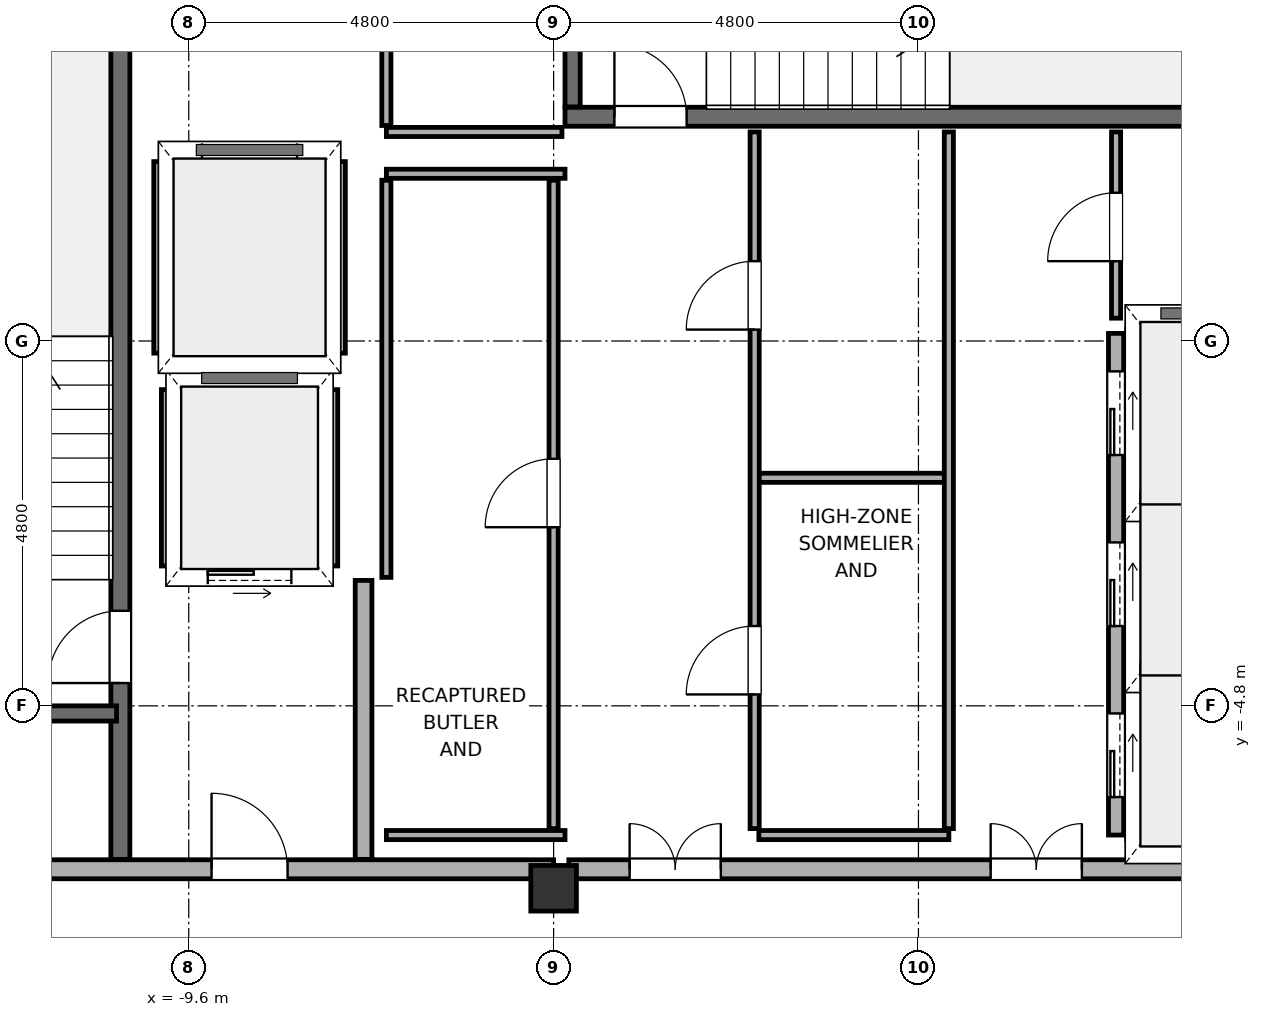
"""IFC4 building model, lengths in metres.
Left out: names, types, materials, properties, quantities, classifications, styles, units other than length and angle.
Written with IfcOpenShell. Run it as: python <this file> out.ifc"""

import sys

from ifc_helpers import new_model, si_unit, direction, frame, frame_2d, origin, origin_2d, place, context, subcontext, project, spatial, rectangle, hollow_rectangle, extrude, element, fill, save


model = new_model("IFC4")
c1 = context("Model", 3, precision=1e-05, world=origin(), true_north=direction((0.0, 1.0)))
c2 = subcontext(c1, "Body", "Model", "MODEL_VIEW")
j1 = project(units=[si_unit("LENGTHUNIT", "METRE"), si_unit("PLANEANGLEUNIT", "RADIAN")], contexts=[c1])
p1 = place(None, origin())
s1 = spatial("IfcSite", under=j1, at=p1, CompositionType="ELEMENT")
p2 = place(p1, origin())
s2 = spatial("IfcBuilding", under=s1, at=p2, CompositionType="ELEMENT")
p3 = place(p2, frame((0.0, 0.0, 249.25)))
s3 = spatial("IfcBuildingStorey", under=s2, at=p3, CompositionType="ELEMENT", Elevation=249.25)
p4 = place(p3, frame((-4.8, -7.2, 0.0), z_axis=(0.0, 0.0, 1.0), x_axis=(1.0, 0.0, 0.0)))
e1 = element("IfcColumn", 1, at=p4, inside=s3, PredefinedType="COLUMN", context=c2, shape_type="SweptSolid", body=[
    extrude(hollow_rectangle(XDim=0.6, YDim=0.6, WallThickness=0.028, at=origin_2d()), origin(), (0.0, 0.0, 1.0), 3.85),
])
p5 = place(p3, frame((-14.2, -6.95, 0.0), z_axis=(0.0, 0.0, 1.0), x_axis=(1.0, 0.0, 0.0)))
e2 = element("IfcWall", 2, at=p5, inside=s3, PredefinedType="SOLIDWALL", context=c2, shape_type="SweptSolid", body=[
    extrude(rectangle(XDim=9.4, YDim=0.25, at=frame_2d((4.7, 0.0))), origin(), (0.0, 0.0, 1.0), 2.27),
])
p6 = place(p5, frame((4.9, 0.0, 0.0)))
e3 = element("IfcOpeningElement", 3, at=p6, cuts=e2, PredefinedType="OPENING", context=c2, shape_type="SweptSolid", body=[
    extrude(rectangle(XDim=1.0, YDim=2.15, at=frame_2d((0.5, 1.075))), frame((0.0, 0.14, 0.0), z_axis=(0.0, -1.0, 0.0), x_axis=(1.0, 0.0, 0.0)), (0.0, 0.0, 1.0), 0.28),
])
p7 = place(p3, frame((-4.6, -6.95, 0.0), z_axis=(0.0, 0.0, 1.0), x_axis=(1.0, 0.0, 0.0)))
e4 = element("IfcWall", 4, at=p7, inside=s3, PredefinedType="SOLIDWALL", context=c2, shape_type="SweptSolid", body=[
    extrude(rectangle(XDim=9.2, YDim=0.25, at=frame_2d((4.6, 0.0))), origin(), (0.0, 0.0, 1.0), 2.47),
])
p8 = place(p7, frame((0.8, 0.0, 0.0)))
e5 = element("IfcOpeningElement", 5, at=p8, cuts=e4, PredefinedType="OPENING", context=c2, shape_type="SweptSolid", body=[
    extrude(rectangle(XDim=1.2, YDim=2.2, at=frame_2d((0.6, 1.1))), frame((0.0, 0.14, 0.0), z_axis=(0.0, -1.0, 0.0), x_axis=(1.0, 0.0, 0.0)), (0.0, 0.0, 1.0), 0.28),
])
p9 = place(p7, frame((5.55, 0.0, 0.0)))
e6 = element("IfcOpeningElement", 6, at=p9, cuts=e4, PredefinedType="OPENING", context=c2, shape_type="SweptSolid", body=[
    extrude(rectangle(XDim=1.2, YDim=2.2, at=frame_2d((0.6, 1.1))), frame((0.0, 0.14, 0.0), z_axis=(0.0, -1.0, 0.0), x_axis=(1.0, 0.0, 0.0)), (0.0, 0.0, 1.0), 0.28),
])
p10 = place(p3, frame((-7.3, -6.82, 0.0), z_axis=(0.0, 0.0, 1.0), x_axis=(0.0, 1.0, 0.0)))
e7 = element("IfcWall", 7, at=p10, inside=s3, PredefinedType="SOLIDWALL", context=c2, shape_type="SweptSolid", body=[
    extrude(rectangle(XDim=3.67, YDim=0.22, at=frame_2d((1.835, 0.0))), origin(), (0.0, 0.0, 1.0), 2.27),
])
p11 = place(p3, frame((-10.5, -6.82, -0.18), z_axis=(0.0, 0.0, 1.0), x_axis=(0.0, 1.0, 0.0)))
e8 = element("IfcWall", 8, at=p11, inside=s3, PredefinedType="SOLIDWALL", context=c2, shape_type="SweptSolid", body=[
    extrude(rectangle(XDim=13.64, YDim=0.25, at=frame_2d((6.82, 0.0))), origin(), (0.0, 0.0, 1.0), 3.85),
])
p12 = place(p11, frame((2.32, 0.0, 0.18)))
e9 = element("IfcOpeningElement", 9, at=p12, cuts=e8, PredefinedType="OPENING", context=c2, shape_type="SweptSolid", body=[
    extrude(rectangle(XDim=0.95, YDim=2.15, at=frame_2d((0.475, 1.075))), frame((0.0, 0.14, 0.0), z_axis=(0.0, -1.0, 0.0), x_axis=(1.0, 0.0, 0.0)), (0.0, 0.0, 1.0), 0.28),
])
p13 = place(p3, frame((-14.2, -4.9, -0.18), z_axis=(0.0, 0.0, 1.0), x_axis=(1.0, 0.0, 0.0)))
e10 = element("IfcWall", 10, at=p13, inside=s3, PredefinedType="SOLIDWALL", context=c2, shape_type="SweptSolid", body=[
    extrude(rectangle(XDim=3.65, YDim=0.2, at=frame_2d((1.825, 0.0))), origin(), (0.0, 0.0, 1.0), 3.85),
])
p14 = place(p3, frame((-4.65, 2.95, -0.18), z_axis=(0.0, 0.0, 1.0), x_axis=(1.0, 0.0, 0.0)))
e11 = element("IfcWall", 11, at=p14, inside=s3, PredefinedType="SOLIDWALL", context=c2, shape_type="SweptSolid", body=[
    extrude(rectangle(XDim=9.9, YDim=0.25, at=frame_2d((4.95, 0.0))), origin(), (0.0, 0.0, 1.0), 3.85),
])
p15 = place(p14, frame((0.65, 0.0, 0.18)))
e12 = element("IfcOpeningElement", 12, at=p15, cuts=e11, PredefinedType="OPENING", context=c2, shape_type="SweptSolid", body=[
    extrude(rectangle(XDim=0.95, YDim=2.15, at=frame_2d((0.475, 1.075))), frame((0.0, 0.14, 0.0), z_axis=(0.0, -1.0, 0.0), x_axis=(1.0, 0.0, 0.0)), (0.0, 0.0, 1.0), 0.28),
])
p16 = place(p3, frame((-4.55, 3.08, -0.18), z_axis=(0.0, 0.0, 1.0), x_axis=(0.0, 1.0, 0.0)))
e13 = element("IfcWall", 13, at=p16, inside=s3, PredefinedType="SOLIDWALL", context=c2, shape_type="SweptSolid", body=[
    extrude(rectangle(XDim=3.74, YDim=0.2, at=frame_2d((1.87, 0.0))), origin(), (0.0, 0.0, 1.0), 3.85),
])
p17 = place(p3, frame((2.6, -6.5, 0.0), z_axis=(0.0, 0.0, 1.0), x_axis=(0.0, 1.0, 0.0)))
e14 = element("IfcWall", 14, at=p17, inside=s3, PredefinedType="SOLIDWALL", context=c2, shape_type="SweptSolid", body=[
    extrude(rectangle(XDim=6.6, YDim=0.2, at=frame_2d((3.3, 0.0))), origin(), (0.0, 0.0, 1.0), 3.67),
])
p18 = place(p17, frame((0.5, 0.0, 0.0)))
e15 = element("IfcOpeningElement", 15, at=p18, cuts=e14, PredefinedType="OPENING", context=c2, shape_type="SweptSolid", body=[
    extrude(rectangle(XDim=1.1, YDim=2.2, at=frame_2d((0.55, 1.1))), frame((0.0, 0.115, 0.0), z_axis=(0.0, -1.0, 0.0), x_axis=(1.0, 0.0, 0.0)), (0.0, 0.0, 1.0), 0.23),
])
p19 = place(p17, frame((2.75, 0.0, 0.0)))
e16 = element("IfcOpeningElement", 16, at=p19, cuts=e14, PredefinedType="OPENING", context=c2, shape_type="SweptSolid", body=[
    extrude(rectangle(XDim=1.1, YDim=2.2, at=frame_2d((0.55, 1.1))), frame((0.0, 0.115, 0.0), z_axis=(0.0, -1.0, 0.0), x_axis=(1.0, 0.0, 0.0)), (0.0, 0.0, 1.0), 0.23),
])
p20 = place(p17, frame((5.0, 0.0, 0.0)))
e17 = element("IfcOpeningElement", 17, at=p20, cuts=e14, PredefinedType="OPENING", context=c2, shape_type="SweptSolid", body=[
    extrude(rectangle(XDim=1.1, YDim=2.2, at=frame_2d((0.55, 1.1))), frame((0.0, 0.115, 0.0), z_axis=(0.0, -1.0, 0.0), x_axis=(1.0, 0.0, 0.0)), (0.0, 0.0, 1.0), 0.23),
])
for number, where, z_axis, x_axis in (
    (18, (2.74, -6.5, 0.0), (0.0, 0.0, 1.0), (1.0, 0.0, 0.0)),
    (19, (2.74, -4.325, 0.0), (0.0, 0.0, 1.0), (1.0, 0.0, 0.0)),
    (20, (2.74, -2.075, 0.0), (0.0, 0.0, 1.0), (1.0, 0.0, 0.0)),
    (21, (2.74, 0.1, 0.0), (0.0, 0.0, 1.0), (1.0, 0.0, 0.0)),
):
    element("IfcWall", number, at=place(p3, frame(where, z_axis=z_axis, x_axis=x_axis)), inside=s3, PredefinedType="PARTITIONING", context=c2, shape_type="SweptSolid", body=[
        extrude(rectangle(XDim=2.17, YDim=0.12, at=frame_2d((1.085, 0.0))), origin(), (0.0, 0.0, 1.0), 3.67),
    ])
p21 = place(p3, frame((-9.82, -3.1, 0.0), z_axis=(0.0, 0.0, 1.0), x_axis=(1.0, 0.0, 0.0)))
e22 = element("IfcWall", 22, at=p21, inside=s3, PredefinedType="SOLIDWALL", context=c2, shape_type="SweptSolid", body=[
    extrude(rectangle(XDim=2.04, YDim=0.2, at=frame_2d((1.02, 0.0))), origin(), (0.0, 0.0, 1.0), 3.67),
])
p22 = place(p21, frame((0.47, 0.0, 0.0)))
e23 = element("IfcOpeningElement", 23, at=p22, cuts=e22, PredefinedType="OPENING", context=c2, shape_type="SweptSolid", body=[
    extrude(rectangle(XDim=1.1, YDim=2.2, at=frame_2d((0.55, 1.1))), frame((0.0, 0.115, 0.0), z_axis=(0.0, -1.0, 0.0), x_axis=(1.0, 0.0, 0.0)), (0.0, 0.0, 1.0), 0.23),
])
p23 = place(p3, frame((-9.82, -0.5, 0.0), z_axis=(0.0, 0.0, 1.0), x_axis=(1.0, 0.0, 0.0)))
e24 = element("IfcWall", 24, at=p23, inside=s3, PredefinedType="SOLIDWALL", context=c2, shape_type="SweptSolid", body=[
    extrude(rectangle(XDim=2.04, YDim=0.2, at=frame_2d((1.02, 0.0))), origin(), (0.0, 0.0, 1.0), 3.67),
])
for number, where, z_axis, x_axis in (
    (25, (-9.9, -2.96, 0.0), (0.0, 0.0, 1.0), (0.0, 1.0, 0.0)),
    (26, (-7.7, -2.96, 0.0), (0.0, 0.0, 1.0), (0.0, 1.0, 0.0)),
):
    element("IfcWall", number, at=place(p3, frame(where, z_axis=z_axis, x_axis=x_axis)), inside=s3, PredefinedType="PARTITIONING", context=c2, shape_type="SweptSolid", body=[
        extrude(rectangle(XDim=2.32, YDim=0.12, at=frame_2d((1.16, 0.0))), origin(), (0.0, 0.0, 1.0), 3.67),
    ])
p24 = place(p3, frame((-9.92, 2.5, 0.0), z_axis=(0.0, 0.0, 1.0), x_axis=(1.0, 0.0, 0.0)))
e27 = element("IfcWall", 27, at=p24, inside=s3, PredefinedType="SOLIDWALL", context=c2, shape_type="SweptSolid", body=[
    extrude(rectangle(XDim=2.24, YDim=0.2, at=frame_2d((1.12, 0.0))), origin(), (0.0, 0.0, 1.0), 3.67),
])
p25 = place(p24, frame((0.495, 0.0, 0.0)))
e28 = element("IfcOpeningElement", 28, at=p25, cuts=e27, PredefinedType="OPENING", context=c2, shape_type="SweptSolid", body=[
    extrude(rectangle(XDim=1.25, YDim=2.25, at=frame_2d((0.625, 1.125))), frame((0.0, 0.115, 0.0), z_axis=(0.0, -1.0, 0.0), x_axis=(1.0, 0.0, 0.0)), (0.0, 0.0, 1.0), 0.23),
])
p26 = place(p3, frame((-9.92, -0.3, 0.0), z_axis=(0.0, 0.0, 1.0), x_axis=(1.0, 0.0, 0.0)))
e29 = element("IfcWall", 29, at=p26, inside=s3, PredefinedType="SOLIDWALL", context=c2, shape_type="SweptSolid", body=[
    extrude(rectangle(XDim=2.24, YDim=0.2, at=frame_2d((1.12, 0.0))), origin(), (0.0, 0.0, 1.0), 3.67),
])
for number, where, z_axis, x_axis in (
    (30, (-10.0, -0.16, 0.0), (0.0, 0.0, 1.0), (0.0, 1.0, 0.0)),
    (31, (-7.6, -0.16, 0.0), (0.0, 0.0, 1.0), (0.0, 1.0, 0.0)),
):
    element("IfcWall", number, at=place(p3, frame(where, z_axis=z_axis, x_axis=x_axis)), inside=s3, PredefinedType="PARTITIONING", context=c2, shape_type="SweptSolid", body=[
        extrude(rectangle(XDim=2.52, YDim=0.12, at=frame_2d((1.26, 0.0))), origin(), (0.0, 0.0, 1.0), 3.67),
    ])
p27 = place(p3, frame((-7.0, -6.5, 0.0), z_axis=(0.0, 0.0, 1.0), x_axis=(1.0, 0.0, 0.0)))
e32 = element("IfcWall", 32, at=p27, inside=s3, PredefinedType="PARTITIONING", context=c2, shape_type="SweptSolid", body=[
    extrude(rectangle(XDim=2.35, YDim=0.12, at=frame_2d((1.175, 0.0))), origin(), (0.0, 0.0, 1.0), 3.67),
])
for number, where, z_axis, x_axis in (
    (33, (-2.1, -6.5, 0.0), (0.0, 0.0, 1.0), (1.0, 0.0, 0.0)),
    (34, (-2.1, -1.8, 0.0), (0.0, 0.0, 1.0), (1.0, 0.0, 0.0)),
):
    element("IfcWall", number, at=place(p3, frame(where, z_axis=z_axis, x_axis=x_axis)), inside=s3, PredefinedType="PARTITIONING", context=c2, shape_type="SweptSolid", body=[
        extrude(rectangle(XDim=2.5, YDim=0.12, at=frame_2d((1.25, 0.0))), origin(), (0.0, 0.0, 1.0), 3.67),
    ])
p28 = place(p3, frame((-7.0, 2.2, 0.0), z_axis=(0.0, 0.0, 1.0), x_axis=(1.0, 0.0, 0.0)))
e35 = element("IfcWall", 35, at=p28, inside=s3, PredefinedType="PARTITIONING", context=c2, shape_type="SweptSolid", body=[
    extrude(rectangle(XDim=2.35, YDim=0.12, at=frame_2d((1.175, 0.0))), origin(), (0.0, 0.0, 1.0), 3.67),
])
p29 = place(p3, frame((-7.0, 2.75, 0.0), z_axis=(0.0, 0.0, 1.0), x_axis=(1.0, 0.0, 0.0)))
e36 = element("IfcWall", 36, at=p29, inside=s3, PredefinedType="PARTITIONING", context=c2, shape_type="SweptSolid", body=[
    extrude(rectangle(XDim=2.31, YDim=0.12, at=frame_2d((1.155, 0.0))), origin(), (0.0, 0.0, 1.0), 3.67),
])
p30 = place(p3, frame((-7.0, -3.11, 0.0), z_axis=(0.0, 0.0, 1.0), x_axis=(0.0, 1.0, 0.0)))
e37 = element("IfcWall", 37, at=p30, inside=s3, PredefinedType="PARTITIONING", context=c2, shape_type="SweptSolid", body=[
    extrude(rectangle(XDim=5.225, YDim=0.12, at=frame_2d((2.613, 0.0))), origin(), (0.0, 0.0, 1.0), 3.67),
])
p31 = place(p3, frame((-7.0, 2.835, 0.0), z_axis=(0.0, 0.0, 1.0), x_axis=(0.0, 1.0, 0.0)))
e38 = element("IfcWall", 38, at=p31, inside=s3, PredefinedType="PARTITIONING", context=c2, shape_type="SweptSolid", body=[
    extrude(rectangle(XDim=3.63, YDim=0.12, at=frame_2d((1.815, 0.0))), origin(), (0.0, 0.0, 1.0), 3.67),
])
p32 = place(p31, frame((1.365, 0.0, 0.0)))
e39 = element("IfcOpeningElement", 39, at=p32, cuts=e38, PredefinedType="OPENING", context=c2, shape_type="SweptSolid", body=[
    extrude(rectangle(XDim=0.9, YDim=2.1, at=frame_2d((0.45, 1.05))), frame((0.0, 0.075, 0.0), z_axis=(0.0, -1.0, 0.0), x_axis=(1.0, 0.0, 0.0)), (0.0, 0.0, 1.0), 0.15),
])
p33 = place(p3, frame((-4.8, -6.415, 0.0), z_axis=(0.0, 0.0, 1.0), x_axis=(0.0, 1.0, 0.0)))
e40 = element("IfcWall", 40, at=p33, inside=s3, PredefinedType="PARTITIONING", context=c2, shape_type="SweptSolid", body=[
    extrude(rectangle(XDim=8.53, YDim=0.12, at=frame_2d((4.265, 0.0))), origin(), (0.0, 0.0, 1.0), 3.67),
])
p34 = place(p33, frame((3.965, 0.0, 0.0)))
e41 = element("IfcOpeningElement", 41, at=p34, cuts=e40, PredefinedType="OPENING", context=c2, shape_type="SweptSolid", body=[
    extrude(rectangle(XDim=0.9, YDim=2.1, at=frame_2d((0.45, 1.05))), frame((0.0, 0.075, 0.0), z_axis=(0.0, -1.0, 0.0), x_axis=(1.0, 0.0, 0.0)), (0.0, 0.0, 1.0), 0.15),
])
p35 = place(p3, frame((-2.155, -6.415, 0.0), z_axis=(0.0, 0.0, 1.0), x_axis=(0.0, 1.0, 0.0)))
e42 = element("IfcWall", 42, at=p35, inside=s3, PredefinedType="PARTITIONING", context=c2, shape_type="SweptSolid", body=[
    extrude(rectangle(XDim=9.165, YDim=0.12, at=frame_2d((4.583, 0.0))), origin(), (0.0, 0.0, 1.0), 3.67),
])
p36 = place(p35, frame((1.765, 0.0, 0.0)))
e43 = element("IfcOpeningElement", 43, at=p36, cuts=e42, PredefinedType="OPENING", context=c2, shape_type="SweptSolid", body=[
    extrude(rectangle(XDim=0.9, YDim=2.1, at=frame_2d((0.45, 1.05))), frame((0.0, 0.075, 0.0), z_axis=(0.0, -1.0, 0.0), x_axis=(1.0, 0.0, 0.0)), (0.0, 0.0, 1.0), 0.15),
])
p37 = place(p35, frame((6.565, 0.0, 0.0)))
e44 = element("IfcOpeningElement", 44, at=p37, cuts=e42, PredefinedType="OPENING", context=c2, shape_type="SweptSolid", body=[
    extrude(rectangle(XDim=0.9, YDim=2.1, at=frame_2d((0.45, 1.05))), frame((0.0, 0.075, 0.0), z_axis=(0.0, -1.0, 0.0), x_axis=(1.0, 0.0, 0.0)), (0.0, 0.0, 1.0), 0.15),
])
p38 = place(p3, frame((0.4, -6.415, 0.0), z_axis=(0.0, 0.0, 1.0), x_axis=(0.0, 1.0, 0.0)))
e45 = element("IfcWall", 45, at=p38, inside=s3, PredefinedType="PARTITIONING", context=c2, shape_type="SweptSolid", body=[
    extrude(rectangle(XDim=9.165, YDim=0.12, at=frame_2d((4.583, 0.0))), origin(), (0.0, 0.0, 1.0), 3.67),
])
p39 = place(p3, frame((2.6, 0.3, 0.0), z_axis=(0.0, 0.0, 1.0), x_axis=(0.0, 1.0, 0.0)))
e46 = element("IfcWall", 46, at=p39, inside=s3, PredefinedType="PARTITIONING", context=c2, shape_type="SweptSolid", body=[
    extrude(rectangle(XDim=2.45, YDim=0.12, at=frame_2d((1.225, 0.0))), origin(), (0.0, 0.0, 1.0), 3.67),
])
p40 = place(p39, frame((0.75, 0.0, 0.0)))
e47 = element("IfcOpeningElement", 47, at=p40, cuts=e46, PredefinedType="OPENING", context=c2, shape_type="SweptSolid", body=[
    extrude(rectangle(XDim=0.9, YDim=2.1, at=frame_2d((0.45, 1.05))), frame((0.0, 0.075, 0.0), z_axis=(0.0, -1.0, 0.0), x_axis=(1.0, 0.0, 0.0)), (0.0, 0.0, 1.0), 0.15),
])
p41 = place(p6, origin())
e48 = element("IfcDoor", 48, at=p41, inside=s3, OperationType="SINGLE_SWING_LEFT", PredefinedType="DOOR", context=c2, shape_type="SweptSolid", body=[
    extrude(rectangle(XDim=1.0, YDim=2.15, at=frame_2d((0.5, 1.075))), frame((0.0, 0.025, 0.0), z_axis=(0.0, -1.0, 0.0), x_axis=(1.0, 0.0, 0.0)), (0.0, 0.0, 1.0), 0.05),
])
fill(e3, e48)
p42 = place(p8, origin())
e49 = element("IfcDoor", 49, at=p42, inside=s3, OperationType="DOUBLE_DOOR_SINGLE_SWING", PredefinedType="DOOR", context=c2, shape_type="SweptSolid", body=[
    extrude(rectangle(XDim=1.2, YDim=2.2, at=frame_2d((0.6, 1.1))), frame((0.0, 0.025, 0.0), z_axis=(0.0, -1.0, 0.0), x_axis=(1.0, 0.0, 0.0)), (0.0, 0.0, 1.0), 0.05),
])
fill(e5, e49)
p43 = place(p9, origin())
e50 = element("IfcDoor", 50, at=p43, inside=s3, OperationType="DOUBLE_DOOR_SINGLE_SWING", PredefinedType="DOOR", context=c2, shape_type="SweptSolid", body=[
    extrude(rectangle(XDim=1.2, YDim=2.2, at=frame_2d((0.6, 1.1))), frame((0.0, 0.025, 0.0), z_axis=(0.0, -1.0, 0.0), x_axis=(1.0, 0.0, 0.0)), (0.0, 0.0, 1.0), 0.05),
])
fill(e6, e50)
p44 = place(p12, origin())
e51 = element("IfcDoor", 51, at=p44, inside=s3, OperationType="SINGLE_SWING_LEFT", PredefinedType="DOOR", context=c2, shape_type="SweptSolid", body=[
    extrude(rectangle(XDim=0.95, YDim=2.15, at=frame_2d((0.475, 1.075))), frame((0.0, 0.025, 0.0), z_axis=(0.0, -1.0, 0.0), x_axis=(1.0, 0.0, 0.0)), (0.0, 0.0, 1.0), 0.05),
])
fill(e9, e51)
p45 = place(p15, origin())
e52 = element("IfcDoor", 52, at=p45, inside=s3, OperationType="SINGLE_SWING_LEFT", PredefinedType="DOOR", context=c2, shape_type="SweptSolid", body=[
    extrude(rectangle(XDim=0.95, YDim=2.15, at=frame_2d((0.475, 1.075))), frame((0.0, 0.025, 0.0), z_axis=(0.0, -1.0, 0.0), x_axis=(1.0, 0.0, 0.0)), (0.0, 0.0, 1.0), 0.05),
])
fill(e12, e52)
p46 = place(p18, origin())
e53 = element("IfcDoor", 53, at=p46, inside=s3, OperationType="SLIDING_TO_LEFT", PredefinedType="DOOR", context=c2, shape_type="SweptSolid", body=[
    extrude(rectangle(XDim=1.1, YDim=2.2, at=frame_2d((0.55, 1.1))), frame((0.0, 0.025, 0.0), z_axis=(0.0, -1.0, 0.0), x_axis=(1.0, 0.0, 0.0)), (0.0, 0.0, 1.0), 0.05),
])
fill(e15, e53)
p47 = place(p19, origin())
e54 = element("IfcDoor", 54, at=p47, inside=s3, OperationType="SLIDING_TO_LEFT", PredefinedType="DOOR", context=c2, shape_type="SweptSolid", body=[
    extrude(rectangle(XDim=1.1, YDim=2.2, at=frame_2d((0.55, 1.1))), frame((0.0, 0.025, 0.0), z_axis=(0.0, -1.0, 0.0), x_axis=(1.0, 0.0, 0.0)), (0.0, 0.0, 1.0), 0.05),
])
fill(e16, e54)
p48 = place(p20, origin())
e55 = element("IfcDoor", 55, at=p48, inside=s3, OperationType="SLIDING_TO_LEFT", PredefinedType="DOOR", context=c2, shape_type="SweptSolid", body=[
    extrude(rectangle(XDim=1.1, YDim=2.2, at=frame_2d((0.55, 1.1))), frame((0.0, 0.025, 0.0), z_axis=(0.0, -1.0, 0.0), x_axis=(1.0, 0.0, 0.0)), (0.0, 0.0, 1.0), 0.05),
])
fill(e17, e55)
p49 = place(p22, origin())
e56 = element("IfcDoor", 56, at=p49, inside=s3, OperationType="SLIDING_TO_LEFT", PredefinedType="DOOR", context=c2, shape_type="SweptSolid", body=[
    extrude(rectangle(XDim=1.1, YDim=2.2, at=frame_2d((0.55, 1.1))), frame((0.0, 0.025, 0.0), z_axis=(0.0, -1.0, 0.0), x_axis=(1.0, 0.0, 0.0)), (0.0, 0.0, 1.0), 0.05),
])
fill(e23, e56)
p50 = place(p25, origin())
e57 = element("IfcDoor", 57, at=p50, inside=s3, OperationType="SLIDING_TO_LEFT", PredefinedType="DOOR", context=c2, shape_type="SweptSolid", body=[
    extrude(rectangle(XDim=1.25, YDim=2.25, at=frame_2d((0.625, 1.125))), frame((0.0, 0.025, 0.0), z_axis=(0.0, -1.0, 0.0), x_axis=(1.0, 0.0, 0.0)), (0.0, 0.0, 1.0), 0.05),
])
fill(e28, e57)
p51 = place(p34, origin())
e58 = element("IfcDoor", 58, at=p51, inside=s3, OperationType="SINGLE_SWING_LEFT", PredefinedType="DOOR", context=c2, shape_type="SweptSolid", body=[
    extrude(rectangle(XDim=0.9, YDim=2.1, at=frame_2d((0.45, 1.05))), frame((0.0, 0.025, 0.0), z_axis=(0.0, -1.0, 0.0), x_axis=(1.0, 0.0, 0.0)), (0.0, 0.0, 1.0), 0.05),
])
fill(e41, e58)
p52 = place(p36, origin())
e59 = element("IfcDoor", 59, at=p52, inside=s3, OperationType="SINGLE_SWING_LEFT", PredefinedType="DOOR", context=c2, shape_type="SweptSolid", body=[
    extrude(rectangle(XDim=0.9, YDim=2.1, at=frame_2d((0.45, 1.05))), frame((0.0, 0.025, 0.0), z_axis=(0.0, -1.0, 0.0), x_axis=(1.0, 0.0, 0.0)), (0.0, 0.0, 1.0), 0.05),
])
fill(e43, e59)
p53 = place(p37, origin())
e60 = element("IfcDoor", 60, at=p53, inside=s3, OperationType="SINGLE_SWING_LEFT", PredefinedType="DOOR", context=c2, shape_type="SweptSolid", body=[
    extrude(rectangle(XDim=0.9, YDim=2.1, at=frame_2d((0.45, 1.05))), frame((0.0, 0.025, 0.0), z_axis=(0.0, -1.0, 0.0), x_axis=(1.0, 0.0, 0.0)), (0.0, 0.0, 1.0), 0.05),
])
fill(e44, e60)
p54 = place(p40, origin())
e61 = element("IfcDoor", 61, at=p54, inside=s3, OperationType="SINGLE_SWING_LEFT", PredefinedType="DOOR", context=c2, shape_type="SweptSolid", body=[
    extrude(rectangle(XDim=0.9, YDim=2.1, at=frame_2d((0.45, 1.05))), frame((0.0, 0.025, 0.0), z_axis=(0.0, -1.0, 0.0), x_axis=(1.0, 0.0, 0.0)), (0.0, 0.0, 1.0), 0.05),
])
fill(e47, e61)
save(model, sys.argv[1])
